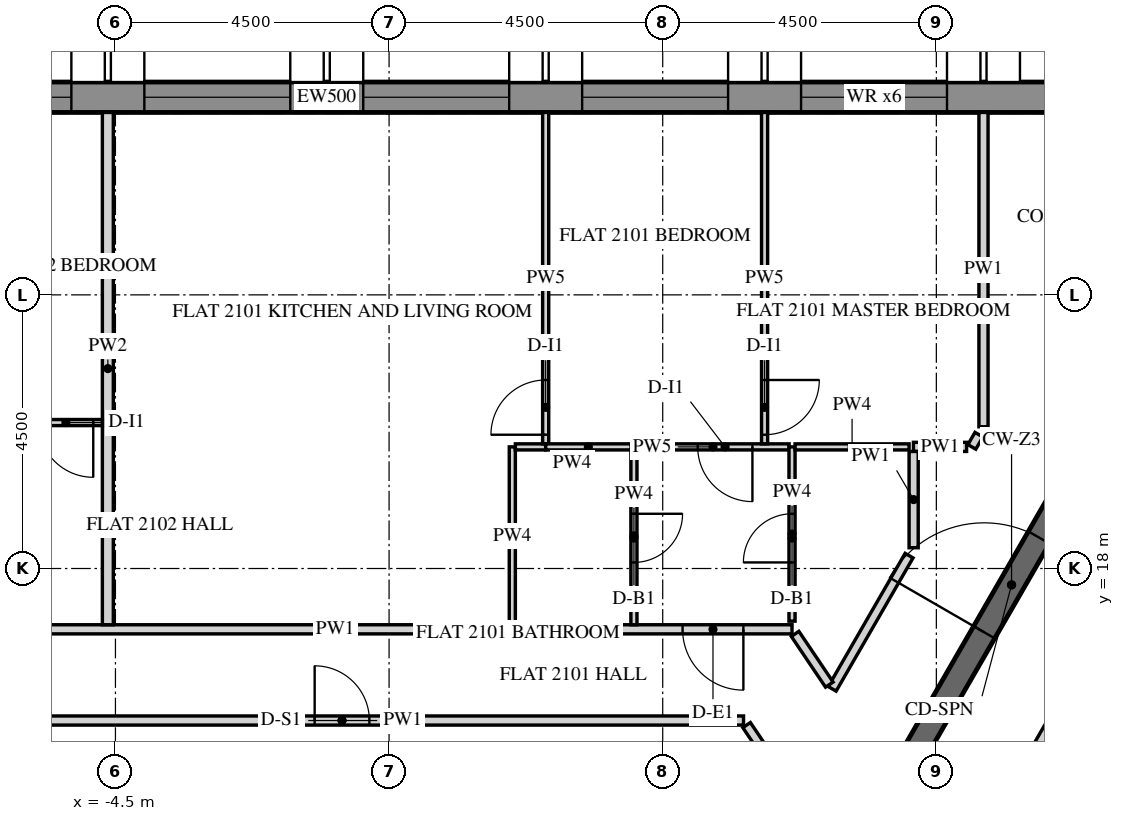
"""IFC4 building model, lengths in metres.
Left out: names, types, materials, properties, quantities, classifications, styles, units other than length and angle.
Written with IfcOpenShell. Run it as: python <this file> out.ifc"""

import sys

from ifc_helpers import new_model, si_unit, direction, frame, frame_2d, origin, place, context, subcontext, project, spatial, polyline, rectangle, outline, extrude, element, fill, save


model = new_model("IFC4")
c1 = context("Model", 3, precision=1e-05, world=origin(), true_north=direction((0.0, 1.0)))
c2 = subcontext(c1, "Body", "Model", "MODEL_VIEW")
j1 = project(units=[si_unit("LENGTHUNIT", "METRE"), si_unit("PLANEANGLEUNIT", "RADIAN")], contexts=[c1])
p1 = place(None, origin())
s1 = spatial("IfcSite", under=j1, at=p1, CompositionType="ELEMENT")
p2 = place(p1, origin())
s2 = spatial("IfcBuilding", under=s1, at=p2, CompositionType="ELEMENT")
p3 = place(p2, frame((0.0, 0.0, 267.9)))
s3 = spatial("IfcBuildingStorey", under=s2, at=p3, CompositionType="ELEMENT", Elevation=267.9)
p4 = place(p3, frame((11.698, 25.75, -0.15), z_axis=(0.0, 0.0, 1.0), x_axis=(-1.0, 0.0, 0.0)))
e1 = element("IfcWall", 1, at=p4, inside=s3, PredefinedType="SOLIDWALL", context=c2, shape_type="SweptSolid", body=[
    extrude(outline(polyline([(-0.021, -0.25), (25.468, -0.25), (25.421, 0.25), (0.021, 0.25), (-0.021, -0.25)])), origin(), (0.0, 0.0, 1.0), 3.9),
])
p5 = place(p4, frame((2.522, 0.0, 0.75)))
e2 = element("IfcOpeningElement", 2, at=p5, cuts=e1, PredefinedType="OPENING", context=c2, shape_type="SweptSolid", body=[
    extrude(rectangle(XDim=2.4, YDim=2.7, at=frame_2d((1.2, 1.35))), frame((0.0, 0.26, 0.0), z_axis=(0.0, -1.0, 0.0), x_axis=(1.0, 0.0, 0.0)), (0.0, 0.0, 1.0), 0.52),
])
p6 = place(p4, frame((6.122, 0.0, 0.75)))
e3 = element("IfcOpeningElement", 3, at=p6, cuts=e1, PredefinedType="OPENING", context=c2, shape_type="SweptSolid", body=[
    extrude(rectangle(XDim=2.4, YDim=2.7, at=frame_2d((1.2, 1.35))), frame((0.0, 0.26, 0.0), z_axis=(0.0, -1.0, 0.0), x_axis=(1.0, 0.0, 0.0)), (0.0, 0.0, 1.0), 0.52),
])
p7 = place(p4, frame((9.722, 0.0, 0.75)))
e4 = element("IfcOpeningElement", 4, at=p7, cuts=e1, PredefinedType="OPENING", context=c2, shape_type="SweptSolid", body=[
    extrude(rectangle(XDim=2.4, YDim=2.7, at=frame_2d((1.2, 1.35))), frame((0.0, 0.26, 0.0), z_axis=(0.0, -1.0, 0.0), x_axis=(1.0, 0.0, 0.0)), (0.0, 0.0, 1.0), 0.52),
])
p8 = place(p4, frame((13.323, 0.0, 0.75)))
e5 = element("IfcOpeningElement", 5, at=p8, cuts=e1, PredefinedType="OPENING", context=c2, shape_type="SweptSolid", body=[
    extrude(rectangle(XDim=2.4, YDim=2.7, at=frame_2d((1.2, 1.35))), frame((0.0, 0.26, 0.0), z_axis=(0.0, -1.0, 0.0), x_axis=(1.0, 0.0, 0.0)), (0.0, 0.0, 1.0), 0.52),
])
p9 = place(p4, frame((16.922, 0.0, 0.75)))
e6 = element("IfcOpeningElement", 6, at=p9, cuts=e1, PredefinedType="OPENING", context=c2, shape_type="SweptSolid", body=[
    extrude(rectangle(XDim=2.4, YDim=2.7, at=frame_2d((1.2, 1.35))), frame((0.0, 0.26, 0.0), z_axis=(0.0, -1.0, 0.0), x_axis=(1.0, 0.0, 0.0)), (0.0, 0.0, 1.0), 0.52),
])
p10 = place(p4, frame((20.522, 0.0, 0.75)))
e7 = element("IfcOpeningElement", 7, at=p10, cuts=e1, PredefinedType="OPENING", context=c2, shape_type="SweptSolid", body=[
    extrude(rectangle(XDim=2.4, YDim=2.7, at=frame_2d((1.2, 1.35))), frame((0.0, 0.26, 0.0), z_axis=(0.0, -1.0, 0.0), x_axis=(1.0, 0.0, 0.0)), (0.0, 0.0, 1.0), 0.52),
])
p11 = place(p3, frame((6.351, 11.0, -0.15), z_axis=(0.0, 0.0, 1.0), x_axis=(0.499998894578, 0.866026041999, 0.0)))
e8 = element("IfcWall", 8, at=p11, inside=s3, PredefinedType="SHEAR", context=c2, shape_type="SweptSolid", body=[
    extrude(rectangle(XDim=15.544, YDim=0.4, at=frame_2d((7.772, 0.0))), origin(), (0.0, 0.0, 1.0), 3.9),
])
p12 = place(p11, frame((6.872, 0.0, 0.15)))
e9 = element("IfcOpeningElement", 9, at=p12, cuts=e8, PredefinedType="OPENING", context=c2, shape_type="SweptSolid", body=[
    extrude(rectangle(XDim=1.8, YDim=2.4, at=frame_2d((0.9, 1.2))), frame((0.0, 0.21, 0.0), z_axis=(0.0, -1.0, 0.0), x_axis=(1.0, 0.0, 0.0)), (0.0, 0.0, 1.0), 0.42),
])
p13 = place(p3, frame((6.627, 17.0, 0.0), z_axis=(0.0, 0.0, 1.0), x_axis=(-1.0, 0.0, 0.0)))
e10 = element("IfcWall", 10, at=p13, inside=s3, PredefinedType="PARTITIONING", context=c2, shape_type="SweptSolid", body=[
    extrude(rectangle(XDim=15.024, YDim=0.15, at=frame_2d((7.512, 0.0))), origin(), (0.0, 0.0, 1.0), 2.988),
])
p14 = place(p13, frame((0.8, 0.0, 0.0)))
e11 = element("IfcOpeningElement", 11, at=p14, cuts=e10, PredefinedType="OPENING", context=c2, shape_type="SweptSolid", body=[
    extrude(rectangle(XDim=1.0, YDim=2.1, at=frame_2d((0.5, 1.05))), frame((0.0, 0.085, 0.0), z_axis=(0.0, -1.0, 0.0), x_axis=(1.0, 0.0, 0.0)), (0.0, 0.0, 1.0), 0.17),
])
p15 = place(p13, frame((12.251, 0.0, 0.0)))
e12 = element("IfcOpeningElement", 12, at=p15, cuts=e10, PredefinedType="OPENING", context=c2, shape_type="SweptSolid", body=[
    extrude(rectangle(XDim=1.0, YDim=2.1, at=frame_2d((0.5, 1.05))), frame((0.0, 0.085, 0.0), z_axis=(0.0, -1.0, 0.0), x_axis=(1.0, 0.0, 0.0)), (0.0, 0.0, 1.0), 0.17),
])
p16 = place(p3, frame((9.775, 25.5, 0.0), z_axis=(0.0, 0.0, 1.0), x_axis=(0.0, -1.0, 0.0)))
e13 = element("IfcWall", 13, at=p16, inside=s3, PredefinedType="PARTITIONING", context=c2, shape_type="SweptSolid", body=[
    extrude(rectangle(XDim=5.169, YDim=0.15, at=frame_2d((2.584, 0.0))), origin(), (0.0, 0.0, 1.0), 2.988),
])
p17 = place(p3, frame((9.7, 20.201, 0.0), z_axis=(0.0, 0.0, 1.0), x_axis=(-0.500207565094, -0.865905532852, 0.0)))
e14 = element("IfcWall", 14, at=p17, inside=s3, PredefinedType="PARTITIONING", context=c2, shape_type="SweptSolid", body=[
    extrude(rectangle(XDim=0.232, YDim=0.15, at=frame_2d((0.116, 0.0))), origin(), (0.0, 0.0, 1.0), 2.988),
])
p18 = place(p3, frame((9.497, 20.0, 0.0), z_axis=(0.0, 0.0, 1.0), x_axis=(-1.0, 0.0, 0.0)))
e15 = element("IfcWall", 15, at=p18, inside=s3, PredefinedType="PARTITIONING", context=c2, shape_type="SweptSolid", body=[
    extrude(rectangle(XDim=0.874, YDim=0.15, at=frame_2d((0.437, 0.0))), origin(), (0.0, 0.0, 1.0), 2.988),
])
p19 = place(p3, frame((8.627, 19.925, 0.0), z_axis=(0.0, 0.0, 1.0), x_axis=(0.0, -1.0, 0.0)))
e16 = element("IfcWall", 16, at=p19, inside=s3, PredefinedType="PARTITIONING", context=c2, shape_type="SweptSolid", body=[
    extrude(rectangle(XDim=1.583, YDim=0.15, at=frame_2d((0.792, 0.0))), origin(), (0.0, 0.0, 1.0), 2.988),
])
p20 = place(p3, frame((8.552, 18.212, 0.0), z_axis=(0.0, 0.0, 1.0), x_axis=(-0.499959175164, -0.866048972731, 0.0)))
e17 = element("IfcWall", 17, at=p20, inside=s3, PredefinedType="PARTITIONING", context=c2, shape_type="SweptSolid", body=[
    extrude(rectangle(XDim=2.53, YDim=0.15, at=frame_2d((1.265, 0.0))), origin(), (0.0, 0.0, 1.0), 2.988),
])
p21 = place(p3, frame((7.24, 16.09, 0.0), z_axis=(0.0, 0.0, 1.0), x_axis=(-0.55916880098, 0.82905382938, 0.0)))
e18 = element("IfcWall", 18, at=p21, inside=s3, PredefinedType="PARTITIONING", context=c2, shape_type="SweptSolid", body=[
    extrude(rectangle(XDim=1.007, YDim=0.15, at=frame_2d((0.503, 0.0))), origin(), (0.0, 0.0, 1.0), 2.988),
])
p22 = place(p3, frame((-7.377, 15.5, 0.0), z_axis=(0.0, 0.0, 1.0), x_axis=(1.0, 0.0, 0.0)))
e19 = element("IfcWall", 19, at=p22, inside=s3, PredefinedType="PARTITIONING", context=c2, shape_type="SweptSolid", body=[
    extrude(rectangle(XDim=13.206, YDim=0.15, at=frame_2d((6.603, 0.0))), origin(), (0.0, 0.0, 1.0), 2.988),
])
p23 = place(p22, frame((6.153, 0.0, 0.0)))
e20 = element("IfcOpeningElement", 20, at=p23, cuts=e19, PredefinedType="OPENING", context=c2, shape_type="SweptSolid", body=[
    extrude(rectangle(XDim=0.9, YDim=2.1, at=frame_2d((0.45, 1.05))), frame((0.0, 0.085, 0.0), z_axis=(0.0, -1.0, 0.0), x_axis=(1.0, 0.0, 0.0)), (0.0, 0.0, 1.0), 0.17),
])
p24 = place(p3, frame((5.88, 15.425, 0.0), z_axis=(0.0, 0.0, 1.0), x_axis=(0.559202631314, -0.829031010959, 0.0)))
e21 = element("IfcWall", 21, at=p24, inside=s3, PredefinedType="PARTITIONING", context=c2, shape_type="SweptSolid", body=[
    extrude(rectangle(XDim=1.024, YDim=0.15, at=frame_2d((0.512, 0.0))), origin(), (0.0, 0.0, 1.0), 2.988),
])
p25 = place(p3, frame((9.444, 12.957, 0.0), z_axis=(0.0, 0.0, 1.0), x_axis=(0.500004967958, 0.866022535513, 0.0)))
e22 = element("IfcWall", 22, at=p25, inside=s3, PredefinedType="PARTITIONING", context=c2, shape_type="SweptSolid", body=[
    extrude(rectangle(XDim=7.431, YDim=0.15, at=frame_2d((3.715, 0.0))), origin(), (0.0, 0.0, 1.0), 2.988),
])
p26 = place(p3, frame((2.027, 17.075, 0.0), z_axis=(0.0, 0.0, 1.0), x_axis=(0.0, 1.0, 0.0)))
e23 = element("IfcWall", 23, at=p26, inside=s3, PredefinedType="PARTITIONING", context=c2, shape_type="SweptSolid", body=[
    extrude(rectangle(XDim=2.925, YDim=0.1, at=frame_2d((1.462, 0.0))), origin(), (0.0, 0.0, 1.0), 2.988),
])
p27 = place(p3, frame((2.077, 20.0, 0.0), z_axis=(0.0, 0.0, 1.0), x_axis=(1.0, 0.0, 0.0)))
e24 = element("IfcWall", 24, at=p27, inside=s3, PredefinedType="PARTITIONING", context=c2, shape_type="SweptSolid", body=[
    extrude(rectangle(XDim=0.5, YDim=0.1, at=frame_2d((0.25, 0.0))), origin(), (0.0, 0.0, 1.0), 2.988),
])
p28 = place(p3, frame((2.575, 20.05, 0.0), z_axis=(0.0, 0.0, 1.0), x_axis=(0.0, 1.0, 0.0)))
e25 = element("IfcWall", 25, at=p28, inside=s3, PredefinedType="PARTITIONING", context=c2, shape_type="SweptSolid", body=[
    extrude(rectangle(XDim=5.45, YDim=0.1, at=frame_2d((2.725, 0.0))), origin(), (0.0, 0.0, 1.0), 2.988),
])
p29 = place(p28, frame((0.15, 0.0, 0.0)))
e26 = element("IfcOpeningElement", 26, at=p29, cuts=e25, PredefinedType="OPENING", context=c2, shape_type="SweptSolid", body=[
    extrude(rectangle(XDim=0.9, YDim=2.1, at=frame_2d((0.45, 1.05))), frame((0.0, 0.06, 0.0), z_axis=(0.0, -1.0, 0.0), x_axis=(1.0, 0.0, 0.0)), (0.0, 0.0, 1.0), 0.12),
])
p30 = place(p3, frame((-4.625, 25.5, 0.0), z_axis=(0.0, 0.0, 1.0), x_axis=(0.0, -1.0, 0.0)))
e27 = element("IfcWall", 27, at=p30, inside=s3, PredefinedType="PARTITIONING", context=c2, shape_type="SweptSolid", body=[
    extrude(rectangle(XDim=8.425, YDim=0.18, at=frame_2d((4.212, 0.0))), origin(), (0.0, 0.0, 1.0), 2.988),
])
p31 = place(p3, frame((4.027, 20.0, 0.0), z_axis=(0.0, 0.0, 1.0), x_axis=(0.0, -1.0, 0.0)))
e28 = element("IfcWall", 28, at=p31, inside=s3, PredefinedType="PARTITIONING", context=c2, shape_type="SweptSolid", body=[
    extrude(rectangle(XDim=2.925, YDim=0.1, at=frame_2d((1.462, 0.0))), origin(), (0.0, 0.0, 1.0), 2.988),
])
p32 = place(p31, frame((1.1, 0.0, 0.0)))
e29 = element("IfcOpeningElement", 29, at=p32, cuts=e28, PredefinedType="OPENING", context=c2, shape_type="SweptSolid", body=[
    extrude(rectangle(XDim=0.8, YDim=2.1, at=frame_2d((0.4, 1.05))), frame((0.0, 0.06, 0.0), z_axis=(0.0, -1.0, 0.0), x_axis=(1.0, 0.0, 0.0)), (0.0, 0.0, 1.0), 0.12),
])
p33 = place(p3, frame((6.579, 20.0, 0.0), z_axis=(0.0, 0.0, 1.0), x_axis=(-1.0, 0.0, 0.0)))
e30 = element("IfcWall", 30, at=p33, inside=s3, PredefinedType="PARTITIONING", context=c2, shape_type="SweptSolid", body=[
    extrude(rectangle(XDim=2.504, YDim=0.1, at=frame_2d((1.252, 0.0))), origin(), (0.0, 0.0, 1.0), 2.988),
])
p34 = place(p33, frame((0.604, 0.0, 0.0)))
e31 = element("IfcOpeningElement", 31, at=p34, cuts=e30, PredefinedType="OPENING", context=c2, shape_type="SweptSolid", body=[
    extrude(rectangle(XDim=0.9, YDim=2.1, at=frame_2d((0.45, 1.05))), frame((0.0, 0.06, 0.0), z_axis=(0.0, -1.0, 0.0), x_axis=(1.0, 0.0, 0.0)), (0.0, 0.0, 1.0), 0.12),
])
p35 = place(p3, frame((6.627, 17.134, 0.0), z_axis=(0.0, 0.0, 1.0), x_axis=(0.0, 1.0, 0.0)))
e32 = element("IfcWall", 32, at=p35, inside=s3, PredefinedType="PARTITIONING", context=c2, shape_type="SweptSolid", body=[
    extrude(rectangle(XDim=2.866, YDim=0.1, at=frame_2d((1.433, 0.0))), origin(), (0.0, 0.0, 1.0), 2.988),
])
p36 = place(p35, frame((0.966, 0.0, 0.0)))
e33 = element("IfcOpeningElement", 33, at=p36, cuts=e32, PredefinedType="OPENING", context=c2, shape_type="SweptSolid", body=[
    extrude(rectangle(XDim=0.8, YDim=2.1, at=frame_2d((0.4, 1.05))), frame((0.0, 0.06, 0.0), z_axis=(0.0, -1.0, 0.0), x_axis=(1.0, 0.0, 0.0)), (0.0, 0.0, 1.0), 0.12),
])
p37 = place(p3, frame((3.979, 20.0, 0.0), z_axis=(0.0, 0.0, 1.0), x_axis=(-1.0, 0.0, 0.0)))
e34 = element("IfcWall", 34, at=p37, inside=s3, PredefinedType="PARTITIONING", context=c2, shape_type="SweptSolid", body=[
    extrude(rectangle(XDim=1.403, YDim=0.1, at=frame_2d((0.702, 0.0))), origin(), (0.0, 0.0, 1.0), 2.988),
])
p38 = place(p3, frame((6.175, 25.5, 0.0), z_axis=(0.0, 0.0, 1.0), x_axis=(0.0, -1.0, 0.0)))
e35 = element("IfcWall", 35, at=p38, inside=s3, PredefinedType="PARTITIONING", context=c2, shape_type="SweptSolid", body=[
    extrude(rectangle(XDim=5.45, YDim=0.1, at=frame_2d((2.725, 0.0))), origin(), (0.0, 0.0, 1.0), 2.988),
])
p39 = place(p38, frame((4.4, 0.0, 0.0)))
e36 = element("IfcOpeningElement", 36, at=p39, cuts=e35, PredefinedType="OPENING", context=c2, shape_type="SweptSolid", body=[
    extrude(rectangle(XDim=0.9, YDim=2.1, at=frame_2d((0.45, 1.05))), frame((0.0, 0.06, 0.0), z_axis=(0.0, -1.0, 0.0), x_axis=(1.0, 0.0, 0.0)), (0.0, 0.0, 1.0), 0.12),
])
p40 = place(p3, frame((6.677, 20.0, 0.0), z_axis=(0.0, 0.0, 1.0), x_axis=(1.0, 0.0, 0.0)))
e37 = element("IfcWall", 37, at=p40, inside=s3, PredefinedType="PARTITIONING", context=c2, shape_type="SweptSolid", body=[
    extrude(rectangle(XDim=1.875, YDim=0.1, at=frame_2d((0.938, 0.0))), origin(), (0.0, 0.0, 1.0), 2.988),
])
p41 = place(p3, frame((-4.715, 20.4, 0.0), z_axis=(0.0, 0.0, 1.0), x_axis=(-1.0, 0.0, 0.0)))
e38 = element("IfcWall", 38, at=p41, inside=s3, PredefinedType="PARTITIONING", context=c2, shape_type="SweptSolid", body=[
    extrude(rectangle(XDim=2.862, YDim=0.1, at=frame_2d((1.431, 0.0))), origin(), (0.0, 0.0, 1.0), 2.988),
])
p42 = place(p41, frame((0.15, 0.0, 0.0)))
e39 = element("IfcOpeningElement", 39, at=p42, cuts=e38, PredefinedType="OPENING", context=c2, shape_type="SweptSolid", body=[
    extrude(rectangle(XDim=0.9, YDim=2.1, at=frame_2d((0.45, 1.05))), frame((0.0, 0.06, 0.0), z_axis=(0.0, -1.0, 0.0), x_axis=(1.0, 0.0, 0.0)), (0.0, 0.0, 1.0), 0.12),
])
p43 = place(p41, frame((1.21, 0.0, 0.0)))
e40 = element("IfcOpeningElement", 40, at=p43, cuts=e38, PredefinedType="OPENING", context=c2, shape_type="SweptSolid", body=[
    extrude(rectangle(XDim=0.9, YDim=2.1, at=frame_2d((0.45, 1.05))), frame((0.0, 0.06, 0.0), z_axis=(0.0, -1.0, 0.0), x_axis=(1.0, 0.0, 0.0)), (0.0, 0.0, 1.0), 0.12),
])
p44 = place(p5, frame((0.0, 0.18, 0.0)))
e41 = element("IfcWindow", 41, at=p44, inside=s3, PartitioningType="DOUBLE_PANEL_VERTICAL", PredefinedType="WINDOW", context=c2, shape_type="SweptSolid", body=[
    extrude(rectangle(XDim=2.4, YDim=2.7, at=frame_2d((1.2, 1.35))), frame((0.0, 0.03, 0.0), z_axis=(0.0, -1.0, 0.0), x_axis=(1.0, 0.0, 0.0)), (0.0, 0.0, 1.0), 0.06),
])
fill(e2, e41)
p45 = place(p6, frame((0.0, 0.18, 0.0)))
e42 = element("IfcWindow", 42, at=p45, inside=s3, PartitioningType="DOUBLE_PANEL_VERTICAL", PredefinedType="WINDOW", context=c2, shape_type="SweptSolid", body=[
    extrude(rectangle(XDim=2.4, YDim=2.7, at=frame_2d((1.2, 1.35))), frame((0.0, 0.03, 0.0), z_axis=(0.0, -1.0, 0.0), x_axis=(1.0, 0.0, 0.0)), (0.0, 0.0, 1.0), 0.06),
])
fill(e3, e42)
p46 = place(p7, frame((0.0, 0.18, 0.0)))
e43 = element("IfcWindow", 43, at=p46, inside=s3, PartitioningType="DOUBLE_PANEL_VERTICAL", PredefinedType="WINDOW", context=c2, shape_type="SweptSolid", body=[
    extrude(rectangle(XDim=2.4, YDim=2.7, at=frame_2d((1.2, 1.35))), frame((0.0, 0.03, 0.0), z_axis=(0.0, -1.0, 0.0), x_axis=(1.0, 0.0, 0.0)), (0.0, 0.0, 1.0), 0.06),
])
fill(e4, e43)
p47 = place(p8, frame((0.0, 0.18, 0.0)))
e44 = element("IfcWindow", 44, at=p47, inside=s3, PartitioningType="DOUBLE_PANEL_VERTICAL", PredefinedType="WINDOW", context=c2, shape_type="SweptSolid", body=[
    extrude(rectangle(XDim=2.4, YDim=2.7, at=frame_2d((1.2, 1.35))), frame((0.0, 0.03, 0.0), z_axis=(0.0, -1.0, 0.0), x_axis=(1.0, 0.0, 0.0)), (0.0, 0.0, 1.0), 0.06),
])
fill(e5, e44)
p48 = place(p9, frame((0.0, 0.18, 0.0)))
e45 = element("IfcWindow", 45, at=p48, inside=s3, PartitioningType="DOUBLE_PANEL_VERTICAL", PredefinedType="WINDOW", context=c2, shape_type="SweptSolid", body=[
    extrude(rectangle(XDim=2.4, YDim=2.7, at=frame_2d((1.2, 1.35))), frame((0.0, 0.03, 0.0), z_axis=(0.0, -1.0, 0.0), x_axis=(1.0, 0.0, 0.0)), (0.0, 0.0, 1.0), 0.06),
])
fill(e6, e45)
p49 = place(p12, origin())
e46 = element("IfcDoor", 46, at=p49, inside=s3, OperationType="DOUBLE_DOOR_SINGLE_SWING", PredefinedType="DOOR", context=c2, shape_type="SweptSolid", body=[
    extrude(rectangle(XDim=1.8, YDim=2.4, at=frame_2d((0.9, 1.2))), frame((0.0, 0.025, 0.0), z_axis=(0.0, -1.0, 0.0), x_axis=(1.0, 0.0, 0.0)), (0.0, 0.0, 1.0), 0.05),
])
fill(e9, e46)
p50 = place(p14, origin())
e47 = element("IfcDoor", 47, at=p50, inside=s3, OperationType="SINGLE_SWING_LEFT", PredefinedType="DOOR", context=c2, shape_type="SweptSolid", body=[
    extrude(rectangle(XDim=1.0, YDim=2.1, at=frame_2d((0.5, 1.05))), frame((0.0, 0.025, 0.0), z_axis=(0.0, -1.0, 0.0), x_axis=(1.0, 0.0, 0.0)), (0.0, 0.0, 1.0), 0.05),
])
fill(e11, e47)
p51 = place(p32, origin())
e48 = element("IfcDoor", 48, at=p51, inside=s3, OperationType="SINGLE_SWING_LEFT", PredefinedType="DOOR", context=c2, shape_type="SweptSolid", body=[
    extrude(rectangle(XDim=0.8, YDim=2.1, at=frame_2d((0.4, 1.05))), frame((0.0, 0.025, 0.0), z_axis=(0.0, -1.0, 0.0), x_axis=(1.0, 0.0, 0.0)), (0.0, 0.0, 1.0), 0.05),
])
fill(e29, e48)
p52 = place(p34, origin())
e49 = element("IfcDoor", 49, at=p52, inside=s3, OperationType="SINGLE_SWING_LEFT", PredefinedType="DOOR", context=c2, shape_type="SweptSolid", body=[
    extrude(rectangle(XDim=0.9, YDim=2.1, at=frame_2d((0.45, 1.05))), frame((0.0, 0.025, 0.0), z_axis=(0.0, -1.0, 0.0), x_axis=(1.0, 0.0, 0.0)), (0.0, 0.0, 1.0), 0.05),
])
fill(e31, e49)
p53 = place(p39, origin())
e50 = element("IfcDoor", 50, at=p53, inside=s3, OperationType="SINGLE_SWING_RIGHT", PredefinedType="DOOR", context=c2, shape_type="SweptSolid", body=[
    extrude(rectangle(XDim=0.9, YDim=2.1, at=frame_2d((0.45, 1.05))), frame((0.0, 0.025, 0.0), z_axis=(0.0, -1.0, 0.0), x_axis=(1.0, 0.0, 0.0)), (0.0, 0.0, 1.0), 0.05),
])
fill(e36, e50)
p54 = place(p29, origin())
e51 = element("IfcDoor", 51, at=p54, inside=s3, OperationType="SINGLE_SWING_RIGHT", PredefinedType="DOOR", context=c2, shape_type="SweptSolid", body=[
    extrude(rectangle(XDim=0.9, YDim=2.1, at=frame_2d((0.45, 1.05))), frame((0.0, 0.025, 0.0), z_axis=(0.0, -1.0, 0.0), x_axis=(1.0, 0.0, 0.0)), (0.0, 0.0, 1.0), 0.05),
])
fill(e26, e51)
p55 = place(p36, origin())
e52 = element("IfcDoor", 52, at=p55, inside=s3, OperationType="SINGLE_SWING_RIGHT", PredefinedType="DOOR", context=c2, shape_type="SweptSolid", body=[
    extrude(rectangle(XDim=0.8, YDim=2.1, at=frame_2d((0.4, 1.05))), frame((0.0, 0.025, 0.0), z_axis=(0.0, -1.0, 0.0), x_axis=(1.0, 0.0, 0.0)), (0.0, 0.0, 1.0), 0.05),
])
fill(e33, e52)
p56 = place(p42, origin())
e53 = element("IfcDoor", 53, at=p56, inside=s3, OperationType="SINGLE_SWING_LEFT", PredefinedType="DOOR", context=c2, shape_type="SweptSolid", body=[
    extrude(rectangle(XDim=0.9, YDim=2.1, at=frame_2d((0.45, 1.05))), frame((0.0, 0.025, 0.0), z_axis=(0.0, -1.0, 0.0), x_axis=(1.0, 0.0, 0.0)), (0.0, 0.0, 1.0), 0.05),
])
fill(e39, e53)
p57 = place(p23, origin())
e54 = element("IfcDoor", 54, at=p57, inside=s3, OperationType="SINGLE_SWING_LEFT", PredefinedType="DOOR", context=c2, shape_type="SweptSolid", body=[
    extrude(rectangle(XDim=0.9, YDim=2.1, at=frame_2d((0.45, 1.05))), frame((0.0, 0.025, 0.0), z_axis=(0.0, -1.0, 0.0), x_axis=(1.0, 0.0, 0.0)), (0.0, 0.0, 1.0), 0.05),
])
fill(e20, e54)
save(model, sys.argv[1])
